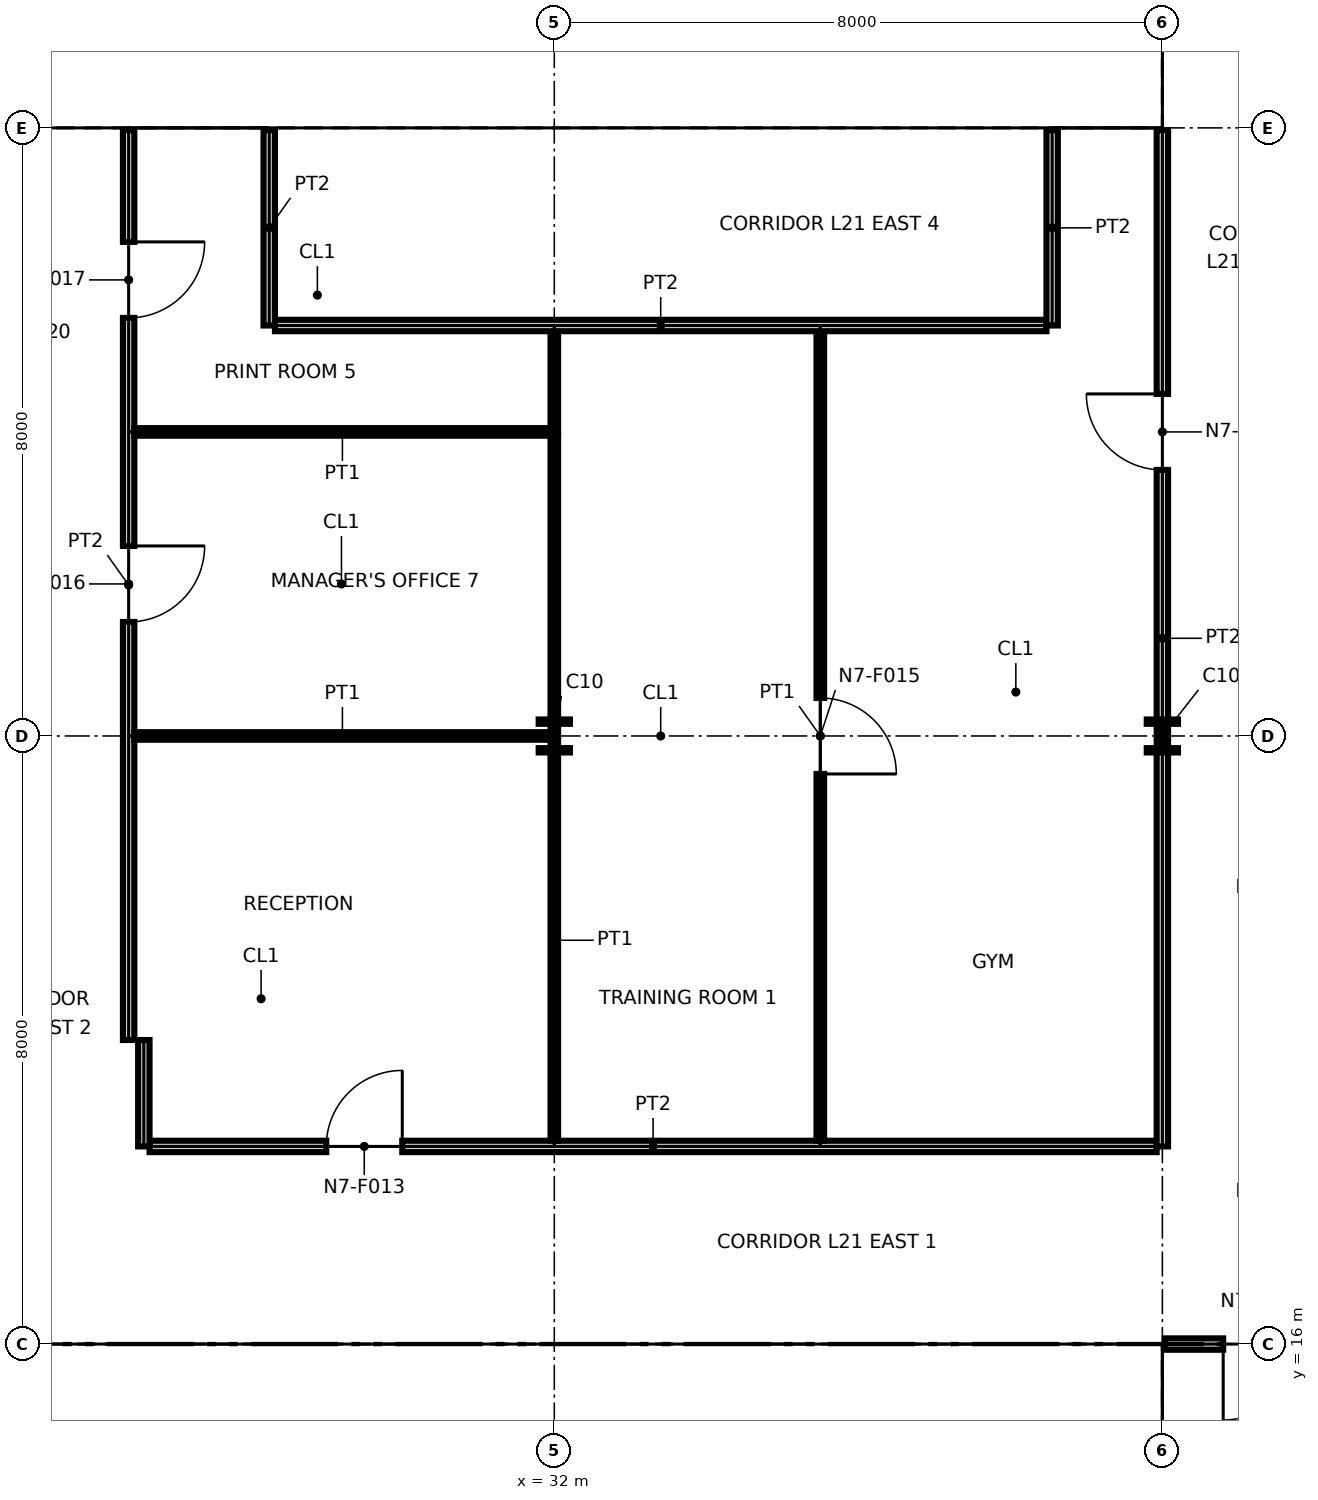
"""IFC4 building model, lengths in metres.
Left out: names, types, materials, properties, quantities, classifications, styles, units other than length and angle.
Written with IfcOpenShell. Run it as: python <this file> out.ifc"""

import sys

from ifc_helpers import new_model, si_unit, direction, frame, frame_2d, origin, origin_2d, place, context, subcontext, project, spatial, polyline, rectangle, i_section, outline, extrude, element, fill, save


model = new_model("IFC4")
c1 = context("Model", 3, precision=1e-05, world=origin(), true_north=direction((0.0, 1.0)))
c2 = subcontext(c1, "Body", "Model", "MODEL_VIEW")
j1 = project(units=[si_unit("LENGTHUNIT", "METRE"), si_unit("PLANEANGLEUNIT", "RADIAN")], contexts=[c1])
p1 = place(None, origin())
s1 = spatial("IfcSite", under=j1, at=p1, CompositionType="ELEMENT")
p2 = place(p1, origin())
s2 = spatial("IfcBuilding", under=s1, at=p2, CompositionType="ELEMENT")
p3 = place(p2, frame((0.0, 0.0, 109.6)))
s3 = spatial("IfcBuildingStorey", under=s2, at=p3, CompositionType="ELEMENT", Elevation=109.6)
p4 = place(p3, frame((32.0, 16.0, 0.0), z_axis=(0.0, 0.0, 1.0), x_axis=(1.0, 0.0, 0.0)))
e1 = element("IfcColumn", 1, at=p4, inside=s3, PredefinedType="COLUMN", context=c2, shape_type="SweptSolid", body=[
    extrude(i_section(OverallWidth=0.406, OverallDepth=0.417, WebThickness=0.03, FlangeThickness=0.048, at=origin_2d()), origin(), (0.0, 0.0, 1.0), 4.15),
])
p5 = place(p3, frame((32.0, 24.0, 0.0), z_axis=(0.0, 0.0, 1.0), x_axis=(1.0, 0.0, 0.0)))
e2 = element("IfcColumn", 2, at=p5, inside=s3, PredefinedType="COLUMN", context=c2, shape_type="SweptSolid", body=[
    extrude(i_section(OverallWidth=0.411, OverallDepth=0.434, WebThickness=0.036, FlangeThickness=0.057, at=origin_2d()), origin(), (0.0, 0.0, 1.0), 4.15),
])
p6 = place(p3, frame((32.0, 32.0, 0.0), z_axis=(0.0, 0.0, 1.0), x_axis=(1.0, 0.0, 0.0)))
e3 = element("IfcColumn", 3, at=p6, inside=s3, PredefinedType="COLUMN", context=c2, shape_type="SweptSolid", body=[
    extrude(i_section(OverallWidth=0.257, OverallDepth=0.363, WebThickness=0.013, FlangeThickness=0.022, at=origin_2d()), origin(), (0.0, 0.0, 1.0), 4.15),
])
p7 = place(p3, frame((40.0, 16.0, 0.0), z_axis=(0.0, 0.0, 1.0), x_axis=(1.0, 0.0, 0.0)))
e4 = element("IfcColumn", 4, at=p7, inside=s3, PredefinedType="COLUMN", context=c2, shape_type="SweptSolid", body=[
    extrude(i_section(OverallWidth=0.406, OverallDepth=0.417, WebThickness=0.03, FlangeThickness=0.048, at=origin_2d()), origin(), (0.0, 0.0, 1.0), 4.15),
])
p8 = place(p3, frame((40.0, 24.0, 0.0), z_axis=(0.0, 0.0, 1.0), x_axis=(1.0, 0.0, 0.0)))
e5 = element("IfcColumn", 5, at=p8, inside=s3, PredefinedType="COLUMN", context=c2, shape_type="SweptSolid", body=[
    extrude(i_section(OverallWidth=0.411, OverallDepth=0.434, WebThickness=0.036, FlangeThickness=0.057, at=origin_2d()), origin(), (0.0, 0.0, 1.0), 4.15),
])
p9 = place(p3, frame((40.0, 32.0, 0.0), z_axis=(0.0, 0.0, 1.0), x_axis=(1.0, 0.0, 0.0)))
e6 = element("IfcColumn", 6, at=p9, inside=s3, PredefinedType="COLUMN", context=c2, shape_type="SweptSolid", body=[
    extrude(i_section(OverallWidth=0.257, OverallDepth=0.363, WebThickness=0.013, FlangeThickness=0.022, at=origin_2d()), origin(), (0.0, 0.0, 1.0), 4.15),
])
p10 = place(p3, frame((24.65, 15.25, 0.0), z_axis=(0.0, 0.0, 1.0), x_axis=(1.0, 0.0, 0.0)))
e7 = element("IfcWall", 7, at=p10, inside=s3, PredefinedType="PARTITIONING", context=c2, shape_type="SweptSolid", body=[
    extrude(outline(polyline([(0.0, 0.0), (14.7, 0.0), (14.7, 4.15), (7.489, 4.15), (7.488, 3.382), (7.212, 3.382), (7.211, 4.15), (0.0, 4.15), (0.0, 0.0)])), frame((0.0, 0.1, 0.0), z_axis=(0.0, -1.0, 0.0), x_axis=(1.0, 0.0, 0.0)), (0.0, 0.0, 1.0), 0.2),
])
p11 = place(p10, frame((2.85, 0.0, 0.0)))
e8 = element("IfcOpeningElement", 8, at=p11, cuts=e7, PredefinedType="OPENING", context=c2, shape_type="SweptSolid", body=[
    extrude(rectangle(XDim=1.8, YDim=2.1, at=frame_2d((0.9, 1.05))), frame((0.0, 0.11, 0.0), z_axis=(0.0, -1.0, 0.0), x_axis=(1.0, 0.0, 0.0)), (0.0, 0.0, 1.0), 0.22),
])
p12 = place(p10, frame((9.95, 0.0, 0.0), z_axis=(0.0, 0.0, 1.0), x_axis=(-1.0, 0.0, 0.0)))
e9 = element("IfcOpeningElement", 9, at=p12, cuts=e7, PredefinedType="OPENING", context=c2, shape_type="SweptSolid", body=[
    extrude(rectangle(XDim=1.4, YDim=2.1, at=frame_2d((0.7, 1.05))), frame((0.0, 0.11, 0.0), z_axis=(0.0, -1.0, 0.0), x_axis=(1.0, 0.0, 0.0)), (0.0, 0.0, 1.0), 0.22),
])
p13 = place(p10, frame((13.4, 0.0, 0.0), z_axis=(0.0, 0.0, 1.0), x_axis=(-1.0, 0.0, 0.0)))
e10 = element("IfcOpeningElement", 10, at=p13, cuts=e7, PredefinedType="OPENING", context=c2, shape_type="SweptSolid", body=[
    extrude(rectangle(XDim=1.4, YDim=2.1, at=frame_2d((0.7, 1.05))), frame((0.0, 0.11, 0.0), z_axis=(0.0, -1.0, 0.0), x_axis=(1.0, 0.0, 0.0)), (0.0, 0.0, 1.0), 0.22),
])
p14 = place(p3, frame((32.0, 12.0, 0.0), z_axis=(0.0, 0.0, 1.0), x_axis=(0.0, 1.0, 0.0)))
e11 = element("IfcWall", 11, at=p14, inside=s3, PredefinedType="PARTITIONING", context=c2, shape_type="SweptSolid", body=[
    extrude(rectangle(XDim=3.15, YDim=0.6, at=frame_2d((1.575, 0.0))), origin(), (0.0, 0.0, 1.0), 3.382),
])
for number, where, z_axis, x_axis in (
    (12, (35.6, 8.85, 0.0), (0.0, 0.0, 1.0), (0.0, 1.0, 0.0)),
    (13, (39.25, 8.85, 0.0), (0.0, 0.0, 1.0), (0.0, 1.0, 0.0)),
):
    element("IfcWall", number, at=place(p3, frame(where, z_axis=z_axis, x_axis=x_axis)), inside=s3, PredefinedType="PARTITIONING", context=c2, shape_type="SweptSolid", body=[
        extrude(rectangle(XDim=6.3, YDim=0.2, at=frame_2d((3.15, 0.0))), origin(), (0.0, 0.0, 1.0), 4.15),
    ])
p15 = place(p3, frame((24.65, 32.75, 0.0), z_axis=(0.0, 0.0, 1.0), x_axis=(1.0, 0.0, 0.0)))
e14 = element("IfcWall", 14, at=p15, inside=s3, PredefinedType="PARTITIONING", context=c2, shape_type="SweptSolid", body=[
    extrude(outline(polyline([(0.0, 0.0), (14.7, 0.0), (14.7, 4.15), (7.489, 4.15), (7.488, 3.382), (7.212, 3.382), (7.211, 4.15), (0.0, 4.15), (0.0, 0.0)])), frame((0.0, 0.1, 0.0), z_axis=(0.0, -1.0, 0.0), x_axis=(1.0, 0.0, 0.0)), (0.0, 0.0, 1.0), 0.2),
])
p16 = place(p15, frame((4.1, 0.0, 0.0)))
e15 = element("IfcOpeningElement", 15, at=p16, cuts=e14, PredefinedType="OPENING", context=c2, shape_type="SweptSolid", body=[
    extrude(rectangle(XDim=1.8, YDim=2.1, at=frame_2d((0.9, 1.05))), frame((0.0, 0.11, 0.0), z_axis=(0.0, -1.0, 0.0), x_axis=(1.0, 0.0, 0.0)), (0.0, 0.0, 1.0), 0.22),
])
p17 = place(p15, frame((8.55, 0.0, 0.0)))
e16 = element("IfcOpeningElement", 16, at=p17, cuts=e14, PredefinedType="OPENING", context=c2, shape_type="SweptSolid", body=[
    extrude(rectangle(XDim=1.4, YDim=2.1, at=frame_2d((0.7, 1.05))), frame((0.0, 0.11, 0.0), z_axis=(0.0, -1.0, 0.0), x_axis=(1.0, 0.0, 0.0)), (0.0, 0.0, 1.0), 0.22),
])
p18 = place(p15, frame((12.0, 0.0, 0.0)))
e17 = element("IfcOpeningElement", 17, at=p18, cuts=e14, PredefinedType="OPENING", context=c2, shape_type="SweptSolid", body=[
    extrude(rectangle(XDim=1.4, YDim=2.1, at=frame_2d((0.7, 1.05))), frame((0.0, 0.11, 0.0), z_axis=(0.0, -1.0, 0.0), x_axis=(1.0, 0.0, 0.0)), (0.0, 0.0, 1.0), 0.22),
])
p19 = place(p3, frame((26.875, 32.85, 0.0), z_axis=(0.0, 0.0, 1.0), x_axis=(0.0, 1.0, 0.0)))
e18 = element("IfcWall", 18, at=p19, inside=s3, PredefinedType="PARTITIONING", context=c2, shape_type="SweptSolid", body=[
    extrude(rectangle(XDim=1.95, YDim=0.15, at=frame_2d((0.975, 0.0))), origin(), (0.0, 0.0, 1.0), 4.15),
])
p20 = place(p19, frame((0.6, 0.0, 0.0)))
e19 = element("IfcOpeningElement", 19, at=p20, cuts=e18, PredefinedType="OPENING", context=c2, shape_type="SweptSolid", body=[
    extrude(rectangle(XDim=0.9, YDim=2.1, at=frame_2d((0.45, 1.05))), frame((0.0, 0.085, 0.0), z_axis=(0.0, -1.0, 0.0), x_axis=(1.0, 0.0, 0.0)), (0.0, 0.0, 1.0), 0.17),
])
p21 = place(p3, frame((32.0, 32.85, 0.0), z_axis=(0.0, 0.0, 1.0), x_axis=(0.0, 1.0, 0.0)))
e20 = element("IfcWall", 20, at=p21, inside=s3, PredefinedType="PARTITIONING", context=c2, shape_type="SweptSolid", body=[
    extrude(rectangle(XDim=3.55, YDim=0.6, at=frame_2d((1.775, 0.0))), origin(), (0.0, 0.0, 1.0), 3.382),
])
for number, where, z_axis, x_axis in (
    (21, (35.6, 32.85, 0.0), (0.0, 0.0, 1.0), (0.0, 1.0, 0.0)),
    (22, (39.25, 32.85, 0.0), (0.0, 0.0, 1.0), (0.0, 1.0, 0.0)),
):
    element("IfcWall", number, at=place(p3, frame(where, z_axis=z_axis, x_axis=x_axis)), inside=s3, PredefinedType="PARTITIONING", context=c2, shape_type="SweptSolid", body=[
        extrude(rectangle(XDim=6.3, YDim=0.2, at=frame_2d((3.15, 0.0))), origin(), (0.0, 0.0, 1.0), 4.15),
    ])
p22 = place(p3, frame((40.03, 16.0, 0.0), z_axis=(0.0, 0.0, 1.0), x_axis=(1.0, 0.0, 0.0)))
e23 = element("IfcWall", 23, at=p22, inside=s3, PredefinedType="PARTITIONING", context=c2, shape_type="SweptSolid", body=[
    extrude(rectangle(XDim=2.495, YDim=0.15, at=frame_2d((1.248, 0.0))), origin(), (0.0, 0.0, 1.0), 3.194),
])
p23 = place(p22, frame((1.77, 0.0, 0.0), z_axis=(0.0, 0.0, 1.0), x_axis=(-1.0, 0.0, 0.0)))
e24 = element("IfcOpeningElement", 24, at=p23, cuts=e23, PredefinedType="OPENING", context=c2, shape_type="SweptSolid", body=[
    extrude(rectangle(XDim=1.0, YDim=2.1, at=frame_2d((0.5, 1.05))), frame((0.0, 0.085, 0.0), z_axis=(0.0, -1.0, 0.0), x_axis=(1.0, 0.0, 0.0)), (0.0, 0.0, 1.0), 0.17),
])
p24 = place(p3, frame((26.675, 18.6, 0.0), z_axis=(0.0, 0.0, 1.0), x_axis=(1.0, 0.0, 0.0)))
e25 = element("IfcWall", 25, at=p24, inside=s3, PredefinedType="PARTITIONING", context=c2, shape_type="SweptSolid", body=[
    extrude(rectangle(XDim=13.25, YDim=0.15, at=frame_2d((6.625, 0.0))), origin(), (0.0, 0.0, 1.0), 3.194),
])
p25 = place(p24, frame((2.325, 0.0, 0.0)))
e26 = element("IfcOpeningElement", 26, at=p25, cuts=e25, PredefinedType="OPENING", context=c2, shape_type="SweptSolid", body=[
    extrude(rectangle(XDim=1.0, YDim=2.1, at=frame_2d((0.5, 1.05))), frame((0.0, 0.085, 0.0), z_axis=(0.0, -1.0, 0.0), x_axis=(1.0, 0.0, 0.0)), (0.0, 0.0, 1.0), 0.17),
])
p26 = place(p3, frame((26.6, 18.6, 0.0), z_axis=(0.0, 0.0, 1.0), x_axis=(0.0, 1.0, 0.0)))
e27 = element("IfcWall", 27, at=p26, inside=s3, PredefinedType="PARTITIONING", context=c2, shape_type="SweptSolid", body=[
    extrude(rectangle(XDim=1.4, YDim=0.15, at=frame_2d((0.7, 0.0))), origin(), (0.0, 0.0, 1.0), 3.194),
])
p27 = place(p3, frame((32.0, 18.675, 0.0), z_axis=(0.0, 0.0, 1.0), x_axis=(0.0, 1.0, 0.0)))
e28 = element("IfcWall", 28, at=p27, inside=s3, PredefinedType="PARTITIONING", context=c2, shape_type="SweptSolid", body=[
    extrude(rectangle(XDim=5.275, YDim=0.1, at=frame_2d((2.637, 0.0))), origin(), (0.0, 0.0, 1.0), 3.194),
])
p28 = place(p3, frame((35.5, 18.675, 0.0), z_axis=(0.0, 0.0, 1.0), x_axis=(0.0, 1.0, 0.0)))
e29 = element("IfcWall", 29, at=p28, inside=s3, PredefinedType="PARTITIONING", context=c2, shape_type="SweptSolid", body=[
    extrude(rectangle(XDim=10.65, YDim=0.1, at=frame_2d((5.325, 0.0))), origin(), (0.0, 0.0, 1.0), 3.194),
])
p29 = place(p28, frame((5.825, 0.0, 0.0), z_axis=(0.0, 0.0, 1.0), x_axis=(-1.0, 0.0, 0.0)))
e30 = element("IfcOpeningElement", 30, at=p29, cuts=e29, PredefinedType="OPENING", context=c2, shape_type="SweptSolid", body=[
    extrude(rectangle(XDim=1.0, YDim=2.1, at=frame_2d((0.5, 1.05))), frame((0.0, 0.06, 0.0), z_axis=(0.0, -1.0, 0.0), x_axis=(1.0, 0.0, 0.0)), (0.0, 0.0, 1.0), 0.12),
])
p30 = place(p3, frame((40.0, 18.6, 0.0), z_axis=(0.0, 0.0, 1.0), x_axis=(0.0, 1.0, 0.0)))
e31 = element("IfcWall", 31, at=p30, inside=s3, PredefinedType="PARTITIONING", context=c2, shape_type="SweptSolid", body=[
    extrude(rectangle(XDim=13.37, YDim=0.15, at=frame_2d((6.685, 0.0))), origin(), (0.0, 0.0, 1.0), 3.194),
])
p31 = place(p30, frame((8.9, 0.0, 0.0)))
e32 = element("IfcOpeningElement", 32, at=p31, cuts=e31, PredefinedType="OPENING", context=c2, shape_type="SweptSolid", body=[
    extrude(rectangle(XDim=1.0, YDim=2.1, at=frame_2d((0.5, 1.05))), frame((0.0, 0.085, 0.0), z_axis=(0.0, -1.0, 0.0), x_axis=(1.0, 0.0, 0.0)), (0.0, 0.0, 1.0), 0.17),
])
p32 = place(p3, frame((26.4, 20.0, 0.0), z_axis=(0.0, 0.0, 1.0), x_axis=(0.0, 1.0, 0.0)))
e33 = element("IfcWall", 33, at=p32, inside=s3, PredefinedType="PARTITIONING", context=c2, shape_type="SweptSolid", body=[
    extrude(rectangle(XDim=11.97, YDim=0.15, at=frame_2d((5.985, 0.0))), origin(), (0.0, 0.0, 1.0), 3.194),
])
p33 = place(p32, frame((6.5, 0.0, 0.0), z_axis=(0.0, 0.0, 1.0), x_axis=(-1.0, 0.0, 0.0)))
e34 = element("IfcOpeningElement", 34, at=p33, cuts=e33, PredefinedType="OPENING", context=c2, shape_type="SweptSolid", body=[
    extrude(rectangle(XDim=1.0, YDim=2.1, at=frame_2d((0.5, 1.05))), frame((0.0, 0.085, 0.0), z_axis=(0.0, -1.0, 0.0), x_axis=(1.0, 0.0, 0.0)), (0.0, 0.0, 1.0), 0.17),
])
p34 = place(p32, frame((10.5, 0.0, 0.0), z_axis=(0.0, 0.0, 1.0), x_axis=(-1.0, 0.0, 0.0)))
e35 = element("IfcOpeningElement", 35, at=p34, cuts=e33, PredefinedType="OPENING", context=c2, shape_type="SweptSolid", body=[
    extrude(rectangle(XDim=1.0, YDim=2.1, at=frame_2d((0.5, 1.05))), frame((0.0, 0.085, 0.0), z_axis=(0.0, -1.0, 0.0), x_axis=(1.0, 0.0, 0.0)), (0.0, 0.0, 1.0), 0.17),
])
p35 = place(p3, frame((26.475, 24.0, 0.0), z_axis=(0.0, 0.0, 1.0), x_axis=(1.0, 0.0, 0.0)))
e36 = element("IfcWall", 36, at=p35, inside=s3, PredefinedType="PARTITIONING", context=c2, shape_type="SweptSolid", body=[
    extrude(rectangle(XDim=5.475, YDim=0.1, at=frame_2d((2.737, 0.0))), origin(), (0.0, 0.0, 1.0), 3.194),
])
p36 = place(p3, frame((32.0, 24.0, 0.0), z_axis=(0.0, 0.0, 1.0), x_axis=(0.0, 1.0, 0.0)))
e37 = element("IfcWall", 37, at=p36, inside=s3, PredefinedType="PARTITIONING", context=c2, shape_type="SweptSolid", body=[
    extrude(rectangle(XDim=3.95, YDim=0.1, at=frame_2d((1.975, 0.0))), origin(), (0.0, 0.0, 1.0), 3.194),
])
p37 = place(p3, frame((26.475, 28.0, 0.0), z_axis=(0.0, 0.0, 1.0), x_axis=(1.0, 0.0, 0.0)))
e38 = element("IfcWall", 38, at=p37, inside=s3, PredefinedType="PARTITIONING", context=c2, shape_type="SweptSolid", body=[
    extrude(rectangle(XDim=5.475, YDim=0.1, at=frame_2d((2.737, 0.0))), origin(), (0.0, 0.0, 1.0), 3.194),
])
p38 = place(p3, frame((32.0, 28.0, 0.0), z_axis=(0.0, 0.0, 1.0), x_axis=(0.0, 1.0, 0.0)))
e39 = element("IfcWall", 39, at=p38, inside=s3, PredefinedType="PARTITIONING", context=c2, shape_type="SweptSolid", body=[
    extrude(rectangle(XDim=1.325, YDim=0.1, at=frame_2d((0.663, 0.0))), origin(), (0.0, 0.0, 1.0), 3.194),
])
p39 = place(p3, frame((28.325, 29.4, 0.0), z_axis=(0.0, 0.0, 1.0), x_axis=(1.0, 0.0, 0.0)))
e40 = element("IfcWall", 40, at=p39, inside=s3, PredefinedType="PARTITIONING", context=c2, shape_type="SweptSolid", body=[
    extrude(rectangle(XDim=10.15, YDim=0.15, at=frame_2d((5.075, 0.0))), origin(), (0.0, 0.0, 1.0), 3.194),
])
for number, where, z_axis, x_axis in (
    (41, (28.25, 29.4, 0.0), (0.0, 0.0, 1.0), (0.0, 1.0, 0.0)),
    (42, (38.55, 29.4, 0.0), (0.0, 0.0, 1.0), (0.0, 1.0, 0.0)),
):
    element("IfcWall", number, at=place(p3, frame(where, z_axis=z_axis, x_axis=x_axis)), inside=s3, PredefinedType="PARTITIONING", context=c2, shape_type="SweptSolid", body=[
        extrude(rectangle(XDim=2.57, YDim=0.15, at=frame_2d((1.285, 0.0))), origin(), (0.0, 0.0, 1.0), 3.194),
    ])
p40 = place(p11, origin())
e43 = element("IfcDoor", 43, at=p40, inside=s3, OperationType="DOUBLE_DOOR_SINGLE_SWING", PredefinedType="NOTDEFINED", context=c2, shape_type="SweptSolid", body=[
    extrude(rectangle(XDim=1.8, YDim=2.1, at=frame_2d((0.9, 1.05))), frame((0.0, 0.025, 0.0), z_axis=(0.0, -1.0, 0.0), x_axis=(1.0, 0.0, 0.0)), (0.0, 0.0, 1.0), 0.05),
])
fill(e8, e43)
p41 = place(p12, origin())
e44 = element("IfcDoor", 44, at=p41, inside=s3, OperationType="DOUBLE_DOOR_SINGLE_SWING", PredefinedType="NOTDEFINED", context=c2, shape_type="SweptSolid", body=[
    extrude(rectangle(XDim=1.4, YDim=2.1, at=frame_2d((0.7, 1.05))), frame((0.0, 0.025, 0.0), z_axis=(0.0, -1.0, 0.0), x_axis=(1.0, 0.0, 0.0)), (0.0, 0.0, 1.0), 0.05),
])
fill(e9, e44)
p42 = place(p13, origin())
e45 = element("IfcDoor", 45, at=p42, inside=s3, OperationType="DOUBLE_DOOR_SINGLE_SWING", PredefinedType="NOTDEFINED", context=c2, shape_type="SweptSolid", body=[
    extrude(rectangle(XDim=1.4, YDim=2.1, at=frame_2d((0.7, 1.05))), frame((0.0, 0.025, 0.0), z_axis=(0.0, -1.0, 0.0), x_axis=(1.0, 0.0, 0.0)), (0.0, 0.0, 1.0), 0.05),
])
fill(e10, e45)
p43 = place(p16, origin())
e46 = element("IfcDoor", 46, at=p43, inside=s3, OperationType="DOUBLE_DOOR_SINGLE_SWING", PredefinedType="NOTDEFINED", context=c2, shape_type="SweptSolid", body=[
    extrude(rectangle(XDim=1.8, YDim=2.1, at=frame_2d((0.9, 1.05))), frame((0.0, 0.025, 0.0), z_axis=(0.0, -1.0, 0.0), x_axis=(1.0, 0.0, 0.0)), (0.0, 0.0, 1.0), 0.05),
])
fill(e15, e46)
p44 = place(p17, origin())
e47 = element("IfcDoor", 47, at=p44, inside=s3, OperationType="DOUBLE_DOOR_SINGLE_SWING", PredefinedType="NOTDEFINED", context=c2, shape_type="SweptSolid", body=[
    extrude(rectangle(XDim=1.4, YDim=2.1, at=frame_2d((0.7, 1.05))), frame((0.0, 0.025, 0.0), z_axis=(0.0, -1.0, 0.0), x_axis=(1.0, 0.0, 0.0)), (0.0, 0.0, 1.0), 0.05),
])
fill(e16, e47)
p45 = place(p18, origin())
e48 = element("IfcDoor", 48, at=p45, inside=s3, OperationType="DOUBLE_DOOR_SINGLE_SWING", PredefinedType="NOTDEFINED", context=c2, shape_type="SweptSolid", body=[
    extrude(rectangle(XDim=1.4, YDim=2.1, at=frame_2d((0.7, 1.05))), frame((0.0, 0.025, 0.0), z_axis=(0.0, -1.0, 0.0), x_axis=(1.0, 0.0, 0.0)), (0.0, 0.0, 1.0), 0.05),
])
fill(e17, e48)
p46 = place(p23, origin())
e49 = element("IfcDoor", 49, at=p46, inside=s3, OperationType="SINGLE_SWING_RIGHT", PredefinedType="DOOR", context=c2, shape_type="SweptSolid", body=[
    extrude(rectangle(XDim=1.0, YDim=2.1, at=frame_2d((0.5, 1.05))), frame((0.0, 0.025, 0.0), z_axis=(0.0, -1.0, 0.0), x_axis=(1.0, 0.0, 0.0)), (0.0, 0.0, 1.0), 0.05),
])
fill(e24, e49)
p47 = place(p25, origin())
e50 = element("IfcDoor", 50, at=p47, inside=s3, OperationType="SINGLE_SWING_RIGHT", PredefinedType="DOOR", context=c2, shape_type="SweptSolid", body=[
    extrude(rectangle(XDim=1.0, YDim=2.1, at=frame_2d((0.5, 1.05))), frame((0.0, 0.025, 0.0), z_axis=(0.0, -1.0, 0.0), x_axis=(1.0, 0.0, 0.0)), (0.0, 0.0, 1.0), 0.05),
])
fill(e26, e50)
p48 = place(p31, origin())
e51 = element("IfcDoor", 51, at=p48, inside=s3, OperationType="SINGLE_SWING_RIGHT", PredefinedType="DOOR", context=c2, shape_type="SweptSolid", body=[
    extrude(rectangle(XDim=1.0, YDim=2.1, at=frame_2d((0.5, 1.05))), frame((0.0, 0.025, 0.0), z_axis=(0.0, -1.0, 0.0), x_axis=(1.0, 0.0, 0.0)), (0.0, 0.0, 1.0), 0.05),
])
fill(e32, e51)
p49 = place(p29, origin())
e52 = element("IfcDoor", 52, at=p49, inside=s3, OperationType="SINGLE_SWING_RIGHT", PredefinedType="DOOR", context=c2, shape_type="SweptSolid", body=[
    extrude(rectangle(XDim=1.0, YDim=2.1, at=frame_2d((0.5, 1.05))), frame((0.0, 0.025, 0.0), z_axis=(0.0, -1.0, 0.0), x_axis=(1.0, 0.0, 0.0)), (0.0, 0.0, 1.0), 0.05),
])
fill(e30, e52)
p50 = place(p33, origin())
e53 = element("IfcDoor", 53, at=p50, inside=s3, OperationType="SINGLE_SWING_LEFT", PredefinedType="DOOR", context=c2, shape_type="SweptSolid", body=[
    extrude(rectangle(XDim=1.0, YDim=2.1, at=frame_2d((0.5, 1.05))), frame((0.0, 0.025, 0.0), z_axis=(0.0, -1.0, 0.0), x_axis=(1.0, 0.0, 0.0)), (0.0, 0.0, 1.0), 0.05),
])
fill(e34, e53)
p51 = place(p34, origin())
e54 = element("IfcDoor", 54, at=p51, inside=s3, OperationType="SINGLE_SWING_LEFT", PredefinedType="DOOR", context=c2, shape_type="SweptSolid", body=[
    extrude(rectangle(XDim=1.0, YDim=2.1, at=frame_2d((0.5, 1.05))), frame((0.0, 0.025, 0.0), z_axis=(0.0, -1.0, 0.0), x_axis=(1.0, 0.0, 0.0)), (0.0, 0.0, 1.0), 0.05),
])
fill(e35, e54)
save(model, sys.argv[1])
